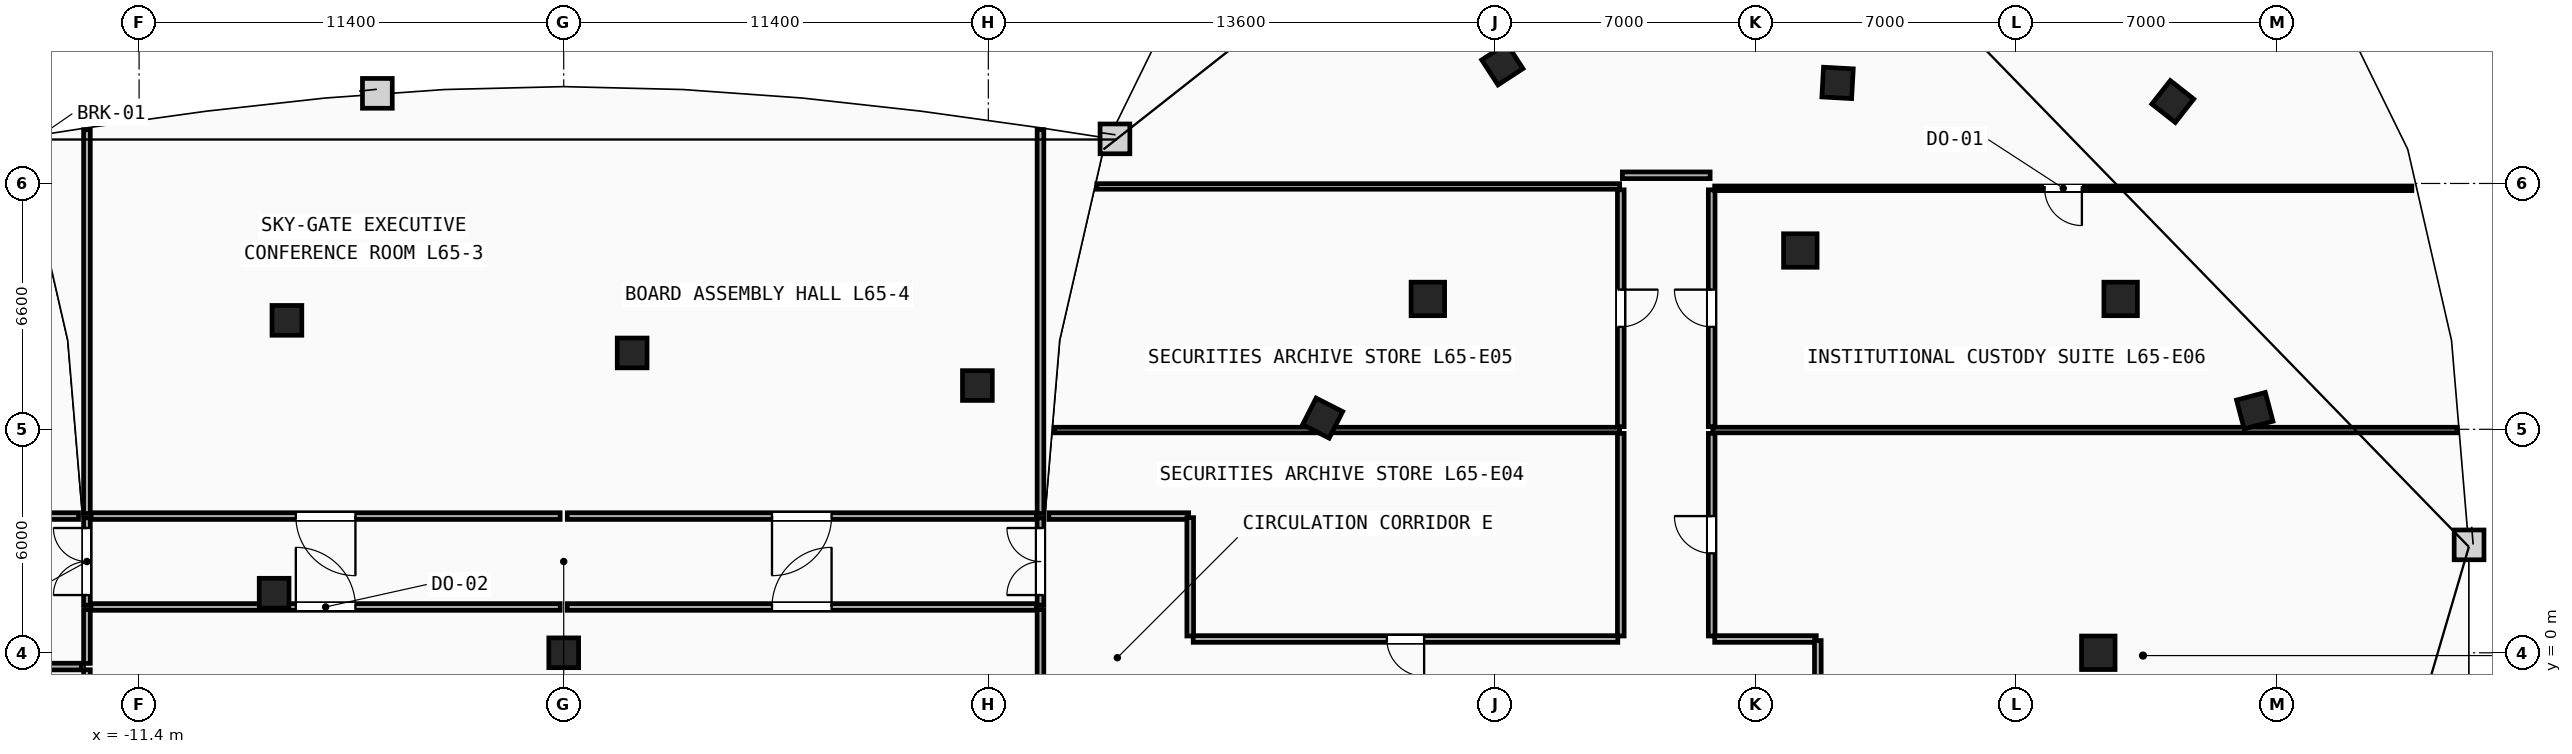
"""IFC4 building model, lengths in metres.
Left out: names, types, materials, properties, quantities, classifications, styles, units other than length and angle.
Written with IfcOpenShell. Run it as: python <this file> out.ifc"""

import sys

from ifc_helpers import new_model, si_unit, direction, frame, frame_2d, origin, origin_2d, place, context, subcontext, project, spatial, rectangle, extrude, element, fill, save


model = new_model("IFC4")
c1 = context("Model", 3, precision=1e-05, world=origin(), true_north=direction((0.0, 1.0)))
c2 = subcontext(c1, "Body", "Model", "MODEL_VIEW")
j1 = project(units=[si_unit("LENGTHUNIT", "METRE"), si_unit("PLANEANGLEUNIT", "RADIAN")], contexts=[c1])
p1 = place(None, origin())
s1 = spatial("IfcSite", under=j1, at=p1, CompositionType="ELEMENT")
p2 = place(p1, origin())
s2 = spatial("IfcBuilding", under=s1, at=p2, CompositionType="ELEMENT")
p3 = place(p2, frame((0.0, 0.0, 246.8)))
s3 = spatial("IfcBuildingStorey", under=s2, at=p3, CompositionType="ELEMENT", Elevation=246.8)
for number, where, z_axis, x_axis in (
    (1, (41.2, 0.0, 0.0), (0.0, 0.0, 1.0), (1.0, 0.0, 0.0)),
    (2, (41.8, 9.5, 0.0), (0.0, 0.0, 1.0), (1.0, 0.0, 0.0)),
    (3, (33.2, 10.8, 0.0), (0.0, 0.0, 1.0), (1.0, 0.0, 0.0)),
    (4, (23.2, 9.5, 0.0), (0.0, 0.0, 1.0), (1.0, 0.0, 0.0)),
):
    element("IfcColumn", number, at=place(p3, frame(where, z_axis=z_axis, x_axis=x_axis)), inside=s3, PredefinedType="COLUMN", context=c2, shape_type="SweptSolid", body=[
        extrude(rectangle(XDim=0.9, YDim=0.9, at=origin_2d()), origin(), (0.0, 0.0, 1.0), 3.6),
    ])
for number, where, z_axis, x_axis in (
    (5, (45.4, 6.5, 0.0), (0.0, 0.0, 1.0), (-0.256, 0.967, 0.0)),
    (6, (43.2, 14.8, 0.0), (0.0, 0.0, 1.0), (-0.786, 0.618, 0.0)),
    (7, (34.2, 15.3, 0.0), (0.0, 0.0, 1.0), (-0.998, 0.055, 0.0)),
    (8, (25.2, 15.8, 0.0), (0.0, 0.0, 1.0), (-0.838, -0.546, 0.0)),
    (9, (20.375, 6.3, 0.0), (0.0, 0.0, 1.0), (-0.453, -0.892, 0.0)),
    (10, (-7.775, 1.6, 0.0), (0.0, 0.0, 1.0), (1.0, 0.0, 0.0)),
    (11, (0.0, 0.0, 0.0), (0.0, 0.0, 1.0), (1.0, 0.0, 0.0)),
    (12, (-7.431, 8.925, 0.0), (0.0, 0.0, 1.0), (1.0, 0.0, 0.0)),
    (13, (1.837, 8.05, 0.0), (0.0, 0.0, 1.0), (1.0, 0.0, 0.0)),
    (14, (11.106, 7.175, 0.0), (0.0, 0.0, 1.0), (1.0, 0.0, 0.0)),
):
    element("IfcColumn", number, at=place(p3, frame(where, z_axis=z_axis, x_axis=x_axis)), inside=s3, PredefinedType="COLUMN", context=c2, shape_type="SweptSolid", body=[
        extrude(rectangle(XDim=0.8, YDim=0.8, at=origin_2d()), origin(), (0.0, 0.0, 1.0), 3.6),
    ])
p4 = place(p3, frame((-28.3, -0.37, 0.0), z_axis=(0.0, 0.0, 1.0), x_axis=(1.0, 0.0, 0.0)))
e15 = element("IfcWall", 15, at=p4, inside=s3, PredefinedType="PARTITIONING", context=c2, shape_type="SweptSolid", body=[
    extrude(rectangle(XDim=15.349, YDim=0.18, at=frame_2d((7.675, 0.0))), origin(), (0.0, 0.0, 1.0), 3.34),
])
p5 = place(p4, frame((7.175, 0.0, 0.0)))
e16 = element("IfcOpeningElement", 16, at=p5, cuts=e15, PredefinedType="OPENING", context=c2, shape_type="SweptSolid", body=[
    extrude(rectangle(XDim=1.0, YDim=2.15, at=frame_2d((0.5, 1.075))), frame((0.0, 0.1, 0.0), z_axis=(0.0, -1.0, 0.0), x_axis=(1.0, 0.0, 0.0)), (0.0, 0.0, 1.0), 0.2),
])
p6 = place(p3, frame((-13.026, 3.67, 0.0), z_axis=(0.0, 0.0, 1.0), x_axis=(-1.0, 0.0, 0.0)))
e17 = element("IfcWall", 17, at=p6, inside=s3, PredefinedType="PARTITIONING", context=c2, shape_type="SweptSolid", body=[
    extrude(rectangle(XDim=3.753, YDim=0.18, at=frame_2d((1.876, 0.0))), origin(), (0.0, 0.0, 1.0), 3.34),
])
p7 = place(p3, frame((13.165, 5.98, 0.0), z_axis=(0.0, 0.0, 1.0), x_axis=(1.0, 0.0, 0.0)))
e18 = element("IfcWall", 18, at=p7, inside=s3, PredefinedType="PARTITIONING", context=c2, shape_type="SweptSolid", body=[
    extrude(rectangle(XDim=15.185, YDim=0.15, at=frame_2d((7.593, 0.0))), origin(), (0.0, 0.0, 1.0), 3.34),
])
p8 = place(p3, frame((30.85, 5.98, 0.0), z_axis=(0.0, 0.0, 1.0), x_axis=(1.0, 0.0, 0.0)))
e19 = element("IfcWall", 19, at=p8, inside=s3, PredefinedType="PARTITIONING", context=c2, shape_type="SweptSolid", body=[
    extrude(rectangle(XDim=19.985, YDim=0.15, at=frame_2d((9.993, 0.0))), origin(), (0.0, 0.0, 1.0), 3.34),
])
p9 = place(p3, frame((14.314, 12.52, 0.0), z_axis=(0.0, 0.0, 1.0), x_axis=(1.0, 0.0, 0.0)))
e20 = element("IfcWall", 20, at=p9, inside=s3, PredefinedType="PARTITIONING", context=c2, shape_type="SweptSolid", body=[
    extrude(rectangle(XDim=14.036, YDim=0.15, at=frame_2d((7.018, 0.0))), origin(), (0.0, 0.0, 1.0), 3.34),
])
p10 = place(p3, frame((30.82, 0.45, 0.0), z_axis=(0.0, 0.0, 1.0), x_axis=(0.0, 1.0, 0.0)))
e21 = element("IfcWall", 21, at=p10, inside=s3, PredefinedType="PARTITIONING", context=c2, shape_type="SweptSolid", body=[
    extrude(rectangle(XDim=5.44, YDim=0.18, at=frame_2d((2.72, 0.0))), origin(), (0.0, 0.0, 1.0), 3.34),
])
p11 = place(p10, frame((2.22, 0.0, 0.0)))
e22 = element("IfcOpeningElement", 22, at=p11, cuts=e21, PredefinedType="OPENING", context=c2, shape_type="SweptSolid", body=[
    extrude(rectangle(XDim=1.0, YDim=2.15, at=frame_2d((0.5, 1.075))), frame((0.0, 0.1, 0.0), z_axis=(0.0, -1.0, 0.0), x_axis=(1.0, 0.0, 0.0)), (0.0, 0.0, 1.0), 0.2),
])
p12 = place(p3, frame((33.628, 0.37, 0.0), z_axis=(0.0, 0.0, 1.0), x_axis=(-1.0, 0.0, 0.0)))
e23 = element("IfcWall", 23, at=p12, inside=s3, PredefinedType="PARTITIONING", context=c2, shape_type="SweptSolid", body=[
    extrude(rectangle(XDim=2.729, YDim=0.18, at=frame_2d((1.364, 0.0))), origin(), (0.0, 0.0, 1.0), 3.34),
])
p13 = place(p3, frame((33.67, -0.859, 0.0), z_axis=(0.0, 0.0, 1.0), x_axis=(0.0, 1.0, 0.0)))
e24 = element("IfcWall", 24, at=p13, inside=s3, PredefinedType="PARTITIONING", context=c2, shape_type="SweptSolid", body=[
    extrude(rectangle(XDim=1.187, YDim=0.18, at=frame_2d((0.594, 0.0))), origin(), (0.0, 0.0, 1.0), 3.34),
])
p14 = place(p3, frame((28.3, 0.37, 0.0), z_axis=(0.0, 0.0, 1.0), x_axis=(-1.0, 0.0, 0.0)))
e25 = element("IfcWall", 25, at=p14, inside=s3, PredefinedType="PARTITIONING", context=c2, shape_type="SweptSolid", body=[
    extrude(rectangle(XDim=11.4, YDim=0.18, at=frame_2d((5.7, 0.0))), origin(), (0.0, 0.0, 1.0), 3.34),
])
p15 = place(p14, frame((5.2, 0.0, 0.0)))
e26 = element("IfcOpeningElement", 26, at=p15, cuts=e25, PredefinedType="OPENING", context=c2, shape_type="SweptSolid", body=[
    extrude(rectangle(XDim=1.0, YDim=2.15, at=frame_2d((0.5, 1.075))), frame((0.0, 0.1, 0.0), z_axis=(0.0, -1.0, 0.0), x_axis=(1.0, 0.0, 0.0)), (0.0, 0.0, 1.0), 0.2),
])
p16 = place(p3, frame((28.38, 5.89, 0.0), z_axis=(0.0, 0.0, 1.0), x_axis=(0.0, -1.0, 0.0)))
e27 = element("IfcWall", 27, at=p16, inside=s3, PredefinedType="PARTITIONING", context=c2, shape_type="SweptSolid", body=[
    extrude(rectangle(XDim=5.44, YDim=0.18, at=frame_2d((2.72, 0.0))), origin(), (0.0, 0.0, 1.0), 3.34),
])
p17 = place(p3, frame((16.779, 3.67, 0.0), z_axis=(0.0, 0.0, 1.0), x_axis=(-1.0, 0.0, 0.0)))
e28 = element("IfcWall", 28, at=p17, inside=s3, PredefinedType="PARTITIONING", context=c2, shape_type="SweptSolid", body=[
    extrude(rectangle(XDim=3.753, YDim=0.18, at=frame_2d((1.876, 0.0))), origin(), (0.0, 0.0, 1.0), 3.34),
])
p18 = place(p3, frame((16.82, 0.45, 0.0), z_axis=(0.0, 0.0, 1.0), x_axis=(0.0, 1.0, 0.0)))
e29 = element("IfcWall", 29, at=p18, inside=s3, PredefinedType="PARTITIONING", context=c2, shape_type="SweptSolid", body=[
    extrude(rectangle(XDim=3.178, YDim=0.18, at=frame_2d((1.589, 0.0))), origin(), (0.0, 0.0, 1.0), 3.34),
])
p19 = place(p3, frame((28.38, 12.43, 0.0), z_axis=(0.0, 0.0, 1.0), x_axis=(0.0, -1.0, 0.0)))
e30 = element("IfcWall", 30, at=p19, inside=s3, PredefinedType="PARTITIONING", context=c2, shape_type="SweptSolid", body=[
    extrude(rectangle(XDim=6.36, YDim=0.18, at=frame_2d((3.18, 0.0))), origin(), (0.0, 0.0, 1.0), 3.34),
])
p20 = place(p19, frame((2.68, 0.0, 0.0)))
e31 = element("IfcOpeningElement", 31, at=p20, cuts=e30, PredefinedType="OPENING", context=c2, shape_type="SweptSolid", body=[
    extrude(rectangle(XDim=1.0, YDim=2.15, at=frame_2d((0.5, 1.075))), frame((0.0, 0.1, 0.0), z_axis=(0.0, -1.0, 0.0), x_axis=(1.0, 0.0, 0.0)), (0.0, 0.0, 1.0), 0.2),
])
p21 = place(p3, frame((30.82, 6.07, 0.0), z_axis=(0.0, 0.0, 1.0), x_axis=(0.0, 1.0, 0.0)))
e32 = element("IfcWall", 32, at=p21, inside=s3, PredefinedType="PARTITIONING", context=c2, shape_type="SweptSolid", body=[
    extrude(rectangle(XDim=6.36, YDim=0.18, at=frame_2d((3.18, 0.0))), origin(), (0.0, 0.0, 1.0), 3.34),
])
p22 = place(p21, frame((2.68, 0.0, 0.0)))
e33 = element("IfcOpeningElement", 33, at=p22, cuts=e32, PredefinedType="OPENING", context=c2, shape_type="SweptSolid", body=[
    extrude(rectangle(XDim=1.0, YDim=2.15, at=frame_2d((0.5, 1.075))), frame((0.0, 0.1, 0.0), z_axis=(0.0, -1.0, 0.0), x_axis=(1.0, 0.0, 0.0)), (0.0, 0.0, 1.0), 0.2),
])
p23 = place(p3, frame((30.779, 12.82, 0.0), z_axis=(0.0, 0.0, 1.0), x_axis=(-1.0, 0.0, 0.0)))
e34 = element("IfcWall", 34, at=p23, inside=s3, PredefinedType="PARTITIONING", context=c2, shape_type="SweptSolid", body=[
    extrude(rectangle(XDim=2.357, YDim=0.18, at=frame_2d((1.179, 0.0))), origin(), (0.0, 0.0, 1.0), 3.34),
])
p24 = place(p3, frame((49.619, 12.47, 0.0), z_axis=(0.0, 0.0, 1.0), x_axis=(-1.0, 0.0, 0.0)))
e35 = element("IfcWall", 35, at=p24, inside=s3, PredefinedType="PARTITIONING", context=c2, shape_type="SweptSolid", body=[
    extrude(rectangle(XDim=18.719, YDim=0.125, at=frame_2d((9.359, 0.0))), origin(), (0.0, 0.0, 1.0), 3.34),
])
p25 = place(p24, frame((8.859, 0.0, 0.0)))
e36 = element("IfcOpeningElement", 36, at=p25, cuts=e35, PredefinedType="OPENING", context=c2, shape_type="SweptSolid", body=[
    extrude(rectangle(XDim=1.0, YDim=2.15, at=frame_2d((0.5, 1.075))), frame((0.0, 0.073, 0.0), z_axis=(0.0, -1.0, 0.0), x_axis=(1.0, 0.0, 0.0)), (0.0, 0.0, 1.0), 0.145),
])
p26 = place(p3, frame((-12.688, 1.23, 0.0), z_axis=(0.0, 0.0, 1.0), x_axis=(1.0, 0.0, 0.0)))
e37 = element("IfcWall", 37, at=p26, inside=s3, PredefinedType="PARTITIONING", context=c2, shape_type="SweptSolid", body=[
    extrude(rectangle(XDim=12.594, YDim=0.18, at=frame_2d((6.297, 0.0))), origin(), (0.0, 0.0, 1.0), 2.663),
])
p27 = place(p26, frame((5.497, 0.0, 0.0)))
e38 = element("IfcOpeningElement", 38, at=p27, cuts=e37, PredefinedType="OPENING", context=c2, shape_type="SweptSolid", body=[
    extrude(rectangle(XDim=1.6, YDim=2.2, at=frame_2d((0.8, 1.1))), frame((0.0, 0.1, 0.0), z_axis=(0.0, -1.0, 0.0), x_axis=(1.0, 0.0, 0.0)), (0.0, 0.0, 1.0), 0.2),
])
p28 = place(p3, frame((0.095, 1.23, 0.0), z_axis=(0.0, 0.0, 1.0), x_axis=(1.0, 0.0, 0.0)))
e39 = element("IfcWall", 39, at=p28, inside=s3, PredefinedType="PARTITIONING", context=c2, shape_type="SweptSolid", body=[
    extrude(rectangle(XDim=12.594, YDim=0.18, at=frame_2d((6.297, 0.0))), origin(), (0.0, 0.0, 1.0), 3.34),
])
p29 = place(p28, frame((5.497, 0.0, 0.0)))
e40 = element("IfcOpeningElement", 40, at=p29, cuts=e39, PredefinedType="OPENING", context=c2, shape_type="SweptSolid", body=[
    extrude(rectangle(XDim=1.6, YDim=2.2, at=frame_2d((0.8, 1.1))), frame((0.0, 0.1, 0.0), z_axis=(0.0, -1.0, 0.0), x_axis=(1.0, 0.0, 0.0)), (0.0, 0.0, 1.0), 0.2),
])
p30 = place(p3, frame((-0.095, 3.67, 0.0), z_axis=(0.0, 0.0, 1.0), x_axis=(-1.0, 0.0, 0.0)))
e41 = element("IfcWall", 41, at=p30, inside=s3, PredefinedType="PARTITIONING", context=c2, shape_type="SweptSolid", body=[
    extrude(rectangle(XDim=12.594, YDim=0.18, at=frame_2d((6.297, 0.0))), origin(), (0.0, 0.0, 1.0), 3.34),
])
p31 = place(p30, frame((5.497, 0.0, 0.0)))
e42 = element("IfcOpeningElement", 42, at=p31, cuts=e41, PredefinedType="OPENING", context=c2, shape_type="SweptSolid", body=[
    extrude(rectangle(XDim=1.6, YDim=2.2, at=frame_2d((0.8, 1.1))), frame((0.0, 0.1, 0.0), z_axis=(0.0, -1.0, 0.0), x_axis=(1.0, 0.0, 0.0)), (0.0, 0.0, 1.0), 0.2),
])
p32 = place(p3, frame((12.688, 3.67, 0.0), z_axis=(0.0, 0.0, 1.0), x_axis=(-1.0, 0.0, 0.0)))
e43 = element("IfcWall", 43, at=p32, inside=s3, PredefinedType="PARTITIONING", context=c2, shape_type="SweptSolid", body=[
    extrude(rectangle(XDim=12.594, YDim=0.18, at=frame_2d((6.297, 0.0))), origin(), (0.0, 0.0, 1.0), 3.34),
])
p33 = place(p32, frame((5.497, 0.0, 0.0)))
e44 = element("IfcOpeningElement", 44, at=p33, cuts=e43, PredefinedType="OPENING", context=c2, shape_type="SweptSolid", body=[
    extrude(rectangle(XDim=1.6, YDim=2.2, at=frame_2d((0.8, 1.1))), frame((0.0, 0.1, 0.0), z_axis=(0.0, -1.0, 0.0), x_axis=(1.0, 0.0, 0.0)), (0.0, 0.0, 1.0), 0.2),
])
p34 = place(p3, frame((-12.8, -14.044, 0.0), z_axis=(0.0, 0.0, 1.0), x_axis=(0.0, 1.0, 0.0)))
e45 = element("IfcWall", 45, at=p34, inside=s3, PredefinedType="PARTITIONING", context=c2, shape_type="SweptSolid", body=[
    extrude(rectangle(XDim=13.589, YDim=0.18, at=frame_2d((6.794, 0.0))), origin(), (0.0, 0.0, 1.0), 3.34),
])
p35 = place(p3, frame((-12.8, -0.285, 0.0), z_axis=(0.0, 0.0, 1.0), x_axis=(0.0, 1.0, 0.0)))
e46 = element("IfcWall", 46, at=p35, inside=s3, PredefinedType="PARTITIONING", context=c2, shape_type="SweptSolid", body=[
    extrude(rectangle(XDim=1.445, YDim=0.18, at=frame_2d((0.722, 0.0))), origin(), (0.0, 0.0, 1.0), 3.34),
])
p36 = place(p3, frame((-12.8, 3.74, 0.0), z_axis=(0.0, 0.0, 1.0), x_axis=(0.0, 1.0, 0.0)))
e47 = element("IfcWall", 47, at=p36, inside=s3, PredefinedType="PARTITIONING", context=c2, shape_type="SweptSolid", body=[
    extrude(rectangle(XDim=10.304, YDim=0.18, at=frame_2d((5.152, 0.0))), origin(), (0.0, 0.0, 1.0), 3.34),
])
p37 = place(p3, frame((-12.8, 1.28, 0.0), z_axis=(0.0, 0.0, 1.0), x_axis=(0.0, 1.0, 0.0)))
e48 = element("IfcWall", 48, at=p37, inside=s3, PredefinedType="PARTITIONING", context=c2, shape_type="SweptSolid", body=[
    extrude(rectangle(XDim=2.34, YDim=0.18, at=frame_2d((1.17, 0.0))), origin(), (0.0, 0.0, 1.0), 3.34),
])
p38 = place(p37, frame((0.27, 0.0, 0.0)))
e49 = element("IfcOpeningElement", 49, at=p38, cuts=e48, PredefinedType="OPENING", context=c2, shape_type="SweptSolid", body=[
    extrude(rectangle(XDim=1.8, YDim=2.25, at=frame_2d((0.9, 1.125))), frame((0.0, 0.1, 0.0), z_axis=(0.0, -1.0, 0.0), x_axis=(1.0, 0.0, 0.0)), (0.0, 0.0, 1.0), 0.2),
])
p39 = place(p3, frame((12.8, -14.044, 0.0), z_axis=(0.0, 0.0, 1.0), x_axis=(0.0, 1.0, 0.0)))
e50 = element("IfcWall", 50, at=p39, inside=s3, PredefinedType="PARTITIONING", context=c2, shape_type="SweptSolid", body=[
    extrude(rectangle(XDim=15.204, YDim=0.18, at=frame_2d((7.602, 0.0))), origin(), (0.0, 0.0, 1.0), 3.34),
])
p40 = place(p3, frame((12.8, 3.74, 0.0), z_axis=(0.0, 0.0, 1.0), x_axis=(0.0, 1.0, 0.0)))
e51 = element("IfcWall", 51, at=p40, inside=s3, PredefinedType="PARTITIONING", context=c2, shape_type="SweptSolid", body=[
    extrude(rectangle(XDim=10.304, YDim=0.18, at=frame_2d((5.152, 0.0))), origin(), (0.0, 0.0, 1.0), 3.34),
])
p41 = place(p3, frame((12.8, 1.28, 0.0), z_axis=(0.0, 0.0, 1.0), x_axis=(0.0, 1.0, 0.0)))
e52 = element("IfcWall", 52, at=p41, inside=s3, PredefinedType="PARTITIONING", context=c2, shape_type="SweptSolid", body=[
    extrude(rectangle(XDim=2.34, YDim=0.18, at=frame_2d((1.17, 0.0))), origin(), (0.0, 0.0, 1.0), 3.34),
])
p42 = place(p41, frame((0.27, 0.0, 0.0)))
e53 = element("IfcOpeningElement", 53, at=p42, cuts=e52, PredefinedType="OPENING", context=c2, shape_type="SweptSolid", body=[
    extrude(rectangle(XDim=1.8, YDim=2.25, at=frame_2d((0.9, 1.125))), frame((0.0, 0.1, 0.0), z_axis=(0.0, -1.0, 0.0), x_axis=(1.0, 0.0, 0.0)), (0.0, 0.0, 1.0), 0.2),
])
p43 = place(p25, origin())
e54 = element("IfcDoor", 54, at=p43, inside=s3, OperationType="SINGLE_SWING_LEFT", PredefinedType="DOOR", context=c2, shape_type="SweptSolid", body=[
    extrude(rectangle(XDim=1.0, YDim=2.15, at=frame_2d((0.5, 1.075))), frame((0.0, 0.025, 0.0), z_axis=(0.0, -1.0, 0.0), x_axis=(1.0, 0.0, 0.0)), (0.0, 0.0, 1.0), 0.05),
])
fill(e36, e54)
p44 = place(p27, origin())
e55 = element("IfcDoor", 55, at=p44, inside=s3, OperationType="SINGLE_SWING_LEFT", PredefinedType="DOOR", context=c2, shape_type="SweptSolid", body=[
    extrude(rectangle(XDim=1.6, YDim=2.2, at=frame_2d((0.8, 1.1))), frame((0.0, 0.025, 0.0), z_axis=(0.0, -1.0, 0.0), x_axis=(1.0, 0.0, 0.0)), (0.0, 0.0, 1.0), 0.05),
])
fill(e38, e55)
p45 = place(p29, origin())
e56 = element("IfcDoor", 56, at=p45, inside=s3, OperationType="SINGLE_SWING_RIGHT", PredefinedType="DOOR", context=c2, shape_type="SweptSolid", body=[
    extrude(rectangle(XDim=1.6, YDim=2.2, at=frame_2d((0.8, 1.1))), frame((0.0, 0.025, 0.0), z_axis=(0.0, -1.0, 0.0), x_axis=(1.0, 0.0, 0.0)), (0.0, 0.0, 1.0), 0.05),
])
fill(e40, e56)
p46 = place(p31, origin())
e57 = element("IfcDoor", 57, at=p46, inside=s3, OperationType="SINGLE_SWING_LEFT", PredefinedType="DOOR", context=c2, shape_type="SweptSolid", body=[
    extrude(rectangle(XDim=1.6, YDim=2.2, at=frame_2d((0.8, 1.1))), frame((0.0, 0.025, 0.0), z_axis=(0.0, -1.0, 0.0), x_axis=(1.0, 0.0, 0.0)), (0.0, 0.0, 1.0), 0.05),
])
fill(e42, e57)
p47 = place(p33, origin())
e58 = element("IfcDoor", 58, at=p47, inside=s3, OperationType="SINGLE_SWING_RIGHT", PredefinedType="DOOR", context=c2, shape_type="SweptSolid", body=[
    extrude(rectangle(XDim=1.6, YDim=2.2, at=frame_2d((0.8, 1.1))), frame((0.0, 0.025, 0.0), z_axis=(0.0, -1.0, 0.0), x_axis=(1.0, 0.0, 0.0)), (0.0, 0.0, 1.0), 0.05),
])
fill(e44, e58)
p48 = place(p15, origin())
e59 = element("IfcDoor", 59, at=p48, inside=s3, OperationType="SINGLE_SWING_LEFT", PredefinedType="DOOR", context=c2, shape_type="SweptSolid", body=[
    extrude(rectangle(XDim=1.0, YDim=2.15, at=frame_2d((0.5, 1.075))), frame((0.0, 0.025, 0.0), z_axis=(0.0, -1.0, 0.0), x_axis=(1.0, 0.0, 0.0)), (0.0, 0.0, 1.0), 0.05),
])
fill(e26, e59)
p49 = place(p20, origin())
e60 = element("IfcDoor", 60, at=p49, inside=s3, OperationType="SINGLE_SWING_LEFT", PredefinedType="DOOR", context=c2, shape_type="SweptSolid", body=[
    extrude(rectangle(XDim=1.0, YDim=2.15, at=frame_2d((0.5, 1.075))), frame((0.0, 0.025, 0.0), z_axis=(0.0, -1.0, 0.0), x_axis=(1.0, 0.0, 0.0)), (0.0, 0.0, 1.0), 0.05),
])
fill(e31, e60)
p50 = place(p22, origin())
e61 = element("IfcDoor", 61, at=p50, inside=s3, OperationType="SINGLE_SWING_RIGHT", PredefinedType="DOOR", context=c2, shape_type="SweptSolid", body=[
    extrude(rectangle(XDim=1.0, YDim=2.15, at=frame_2d((0.5, 1.075))), frame((0.0, 0.025, 0.0), z_axis=(0.0, -1.0, 0.0), x_axis=(1.0, 0.0, 0.0)), (0.0, 0.0, 1.0), 0.05),
])
fill(e33, e61)
p51 = place(p11, origin())
e62 = element("IfcDoor", 62, at=p51, inside=s3, OperationType="SINGLE_SWING_RIGHT", PredefinedType="DOOR", context=c2, shape_type="SweptSolid", body=[
    extrude(rectangle(XDim=1.0, YDim=2.15, at=frame_2d((0.5, 1.075))), frame((0.0, 0.025, 0.0), z_axis=(0.0, -1.0, 0.0), x_axis=(1.0, 0.0, 0.0)), (0.0, 0.0, 1.0), 0.05),
])
fill(e22, e62)
p52 = place(p38, origin())
e63 = element("IfcDoor", 63, at=p52, inside=s3, OperationType="DOUBLE_DOOR_SINGLE_SWING", PredefinedType="DOOR", context=c2, shape_type="SweptSolid", body=[
    extrude(rectangle(XDim=1.8, YDim=2.25, at=frame_2d((0.9, 1.125))), frame((0.0, 0.025, 0.0), z_axis=(0.0, -1.0, 0.0), x_axis=(1.0, 0.0, 0.0)), (0.0, 0.0, 1.0), 0.05),
])
fill(e49, e63)
p53 = place(p42, origin())
e64 = element("IfcDoor", 64, at=p53, inside=s3, OperationType="DOUBLE_DOOR_SINGLE_SWING", PredefinedType="DOOR", context=c2, shape_type="SweptSolid", body=[
    extrude(rectangle(XDim=1.8, YDim=2.25, at=frame_2d((0.9, 1.125))), frame((0.0, 0.025, 0.0), z_axis=(0.0, -1.0, 0.0), x_axis=(1.0, 0.0, 0.0)), (0.0, 0.0, 1.0), 0.05),
])
fill(e53, e64)
save(model, sys.argv[1])
